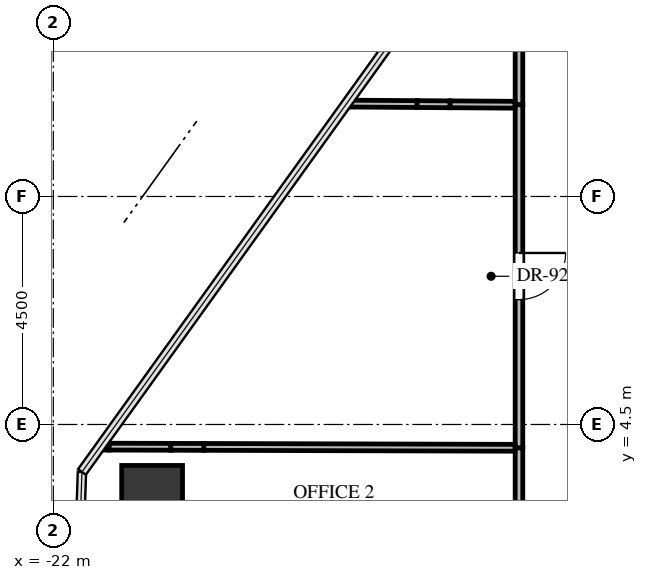
"""IFC4 building model, lengths in metres.
Left out: names, types, materials, properties, quantities, classifications, styles, units other than length and angle.
Written with IfcOpenShell. Run it as: python <this file> out.ifc"""

import sys

from ifc_helpers import new_model, si_unit, direction, frame, frame_2d, origin, origin_2d, place, context, subcontext, project, spatial, rectangle, extrude, source, transform, mapped, element, fill, save


model = new_model("IFC4")
c1 = context("Model", 3, precision=1e-05, world=origin(), true_north=direction((0.0, 1.0)))
c2 = subcontext(c1, "Body", "Model", "MODEL_VIEW")
j1 = project(units=[si_unit("LENGTHUNIT", "METRE"), si_unit("PLANEANGLEUNIT", "RADIAN")], contexts=[c1])
p1 = place(None, origin())
s1 = spatial("IfcSite", under=j1, at=p1, CompositionType="ELEMENT")
p2 = place(p1, origin())
s2 = spatial("IfcBuilding", under=s1, at=p2, CompositionType="ELEMENT")
p3 = place(p2, frame((0.0, 0.0, 140.1)))
s3 = spatial("IfcBuildingStorey", under=s2, at=p3, CompositionType="ELEMENT", Elevation=140.1)
m1 = source(origin(), c2, "Body", "SweptSolid", [
    extrude(rectangle(XDim=1.2, YDim=1.2, at=origin_2d()), origin(), (0.0, 0.0, 1.0), 3.0),
])
p4 = place(p3, frame((-20.05, 3.091, -0.24), z_axis=(0.0, 0.0, 1.0), x_axis=(1.0, 0.0, 0.0)))
e1 = element("IfcColumn", 1, at=p4, inside=s3, PredefinedType="COLUMN", context=c2, shape_type="MappedRepresentation", body=[
    mapped(m1, transform((0.0, 0.0, 0.0), x_axis=(1.0, 0.0, 0.0), y_axis=(0.0, 1.0, 0.0), z_axis=(0.0, 0.0, 1.0), scale=1.0)),
])
p5 = place(p3, frame((-12.81, 12.081, 0.0), z_axis=(0.0, 0.0, 1.0), x_axis=(0.0, -1.0, 0.0)))
e2 = element("IfcWall", 2, at=p5, inside=s3, PredefinedType="PARTITIONING", context=c2, shape_type="SweptSolid", body=[
    extrude(rectangle(XDim=1.271, YDim=0.15, at=frame_2d((0.635, 0.0))), origin(), (0.0, 0.0, 1.0), 2.745),
])
p6 = place(p3, frame((-12.81, 4.04, 0.0), z_axis=(0.0, 0.0, 1.0), x_axis=(0.0, -1.0, 0.0)))
e3 = element("IfcWall", 3, at=p6, inside=s3, PredefinedType="PARTITIONING", context=c2, shape_type="SweptSolid", body=[
    extrude(rectangle(XDim=1.092, YDim=0.15, at=frame_2d((0.546, 0.0))), origin(), (0.0, 0.0, 1.0), 2.745),
])
p7 = place(p3, frame((-12.81, 10.81, 0.0), z_axis=(0.0, 0.0, 1.0), x_axis=(0.0, -1.0, 0.0)))
e4 = element("IfcWall", 4, at=p7, inside=s3, PredefinedType="PARTITIONING", context=c2, shape_type="SweptSolid", body=[
    extrude(rectangle(XDim=6.77, YDim=0.15, at=frame_2d((3.385, 0.0))), origin(), (0.0, 0.0, 1.0), 2.745),
])
p8 = place(p7, frame((2.925, 0.0, 0.0)))
e5 = element("IfcOpeningElement", 5, at=p8, cuts=e4, PredefinedType="OPENING", context=c2, shape_type="SweptSolid", body=[
    extrude(rectangle(XDim=0.92, YDim=2.1, at=frame_2d((0.46, 1.05))), frame((0.0, 0.085, 0.0), z_axis=(0.0, -1.0, 0.0), x_axis=(1.0, 0.0, 0.0)), (0.0, 0.0, 1.0), 0.17),
])
p9 = place(p3, frame((-12.889, 10.811, 0.0), z_axis=(0.0, 0.0, 1.0), x_axis=(-0.999976553189, 0.00684785161, 0.0)))
e6 = element("IfcWall", 6, at=p9, inside=s3, PredefinedType="PARTITIONING", context=c2, shape_type="SweptSolid", body=[
    extrude(rectangle(XDim=1.283, YDim=0.135, at=frame_2d((0.642, 0.0))), origin(), (0.0, 0.0, 1.0), 2.745),
])
p10 = place(p3, frame((-14.821, 10.824, 0.0), z_axis=(0.0, 0.0, 1.0), x_axis=(-0.999976577186, 0.006844346527, 0.0)))
e7 = element("IfcWall", 7, at=p10, inside=s3, PredefinedType="PARTITIONING", context=c2, shape_type="SweptSolid", body=[
    extrude(rectangle(XDim=1.391, YDim=0.135, at=frame_2d((0.696, 0.0))), origin(), (0.0, 0.0, 1.0), 2.745),
])
p11 = place(p3, frame((-14.172, 10.819, 0.0), z_axis=(0.0, 0.0, 1.0), x_axis=(-0.999977036192, 0.006776952806, 0.0)))
e8 = element("IfcWall", 8, at=p11, inside=s3, PredefinedType="PARTITIONING", context=c2, shape_type="SweptSolid", body=[
    extrude(rectangle(XDim=0.648, YDim=0.135, at=frame_2d((0.324, 0.0))), origin(), (0.0, 0.0, 1.0), 2.08),
])
p12 = place(p3, frame((-20.901, 4.063, 0.0), z_axis=(0.0, 0.0, 1.0), x_axis=(0.999996083157, -0.002798869485, 0.0)))
e9 = element("IfcWall", 9, at=p12, inside=s3, PredefinedType="PARTITIONING", context=c2, shape_type="SweptSolid", body=[
    extrude(rectangle(XDim=1.221, YDim=0.135, at=frame_2d((0.611, 0.0))), origin(), (0.0, 0.0, 1.0), 1.577),
])
p13 = place(p3, frame((-19.03, 4.058, 0.0), z_axis=(0.0, 0.0, 1.0), x_axis=(0.999996016453, -0.002822601462, 0.0)))
e10 = element("IfcWall", 10, at=p13, inside=s3, PredefinedType="PARTITIONING", context=c2, shape_type="SweptSolid", body=[
    extrude(rectangle(XDim=6.141, YDim=0.135, at=frame_2d((3.071, 0.0))), origin(), (0.0, 0.0, 1.0), 2.745),
])
p14 = place(p3, frame((-21.075, 4.063, 0.0), z_axis=(0.0, 0.0, 1.0), x_axis=(0.999996065873, -0.002805038053, 0.0)))
e11 = element("IfcWall", 11, at=p14, inside=s3, PredefinedType="PARTITIONING", context=c2, shape_type="SweptSolid", body=[
    extrude(rectangle(XDim=0.174, YDim=0.135, at=frame_2d((0.087, 0.0))), origin(), (0.0, 0.0, 1.0), 1.577),
])
p15 = place(p3, frame((-19.68, 4.059, 0.0), z_axis=(0.0, 0.0, 1.0), x_axis=(0.999996545211, -0.002628605263, 0.0)))
e12 = element("IfcWall", 12, at=p15, inside=s3, PredefinedType="PARTITIONING", context=c2, shape_type="SweptSolid", body=[
    extrude(rectangle(XDim=0.65, YDim=0.135, at=frame_2d((0.325, 0.0))), origin(), (0.0, 0.0, 1.0), 2.08),
])
m2 = source(origin(), c2, "Body", "SweptSolid", [
    extrude(rectangle(XDim=0.92, YDim=2.1, at=frame_2d((0.46, 1.05))), frame((0.0, 0.025, 0.0), z_axis=(0.0, -1.0, 0.0), x_axis=(1.0, 0.0, 0.0)), (0.0, 0.0, 1.0), 0.05),
])
p16 = place(p8, origin())
e13 = element("IfcDoor", 13, at=p16, inside=s3, OperationType="SINGLE_SWING_LEFT", PredefinedType="DOOR", context=c2, shape_type="MappedRepresentation", body=[
    mapped(m2, transform((0.0, 0.0, 0.0), x_axis=(1.0, 0.0, 0.0), y_axis=(0.0, 1.0, 0.0), z_axis=(0.0, 0.0, 1.0), scale=1.0)),
])
fill(e5, e13)
save(model, sys.argv[1])
